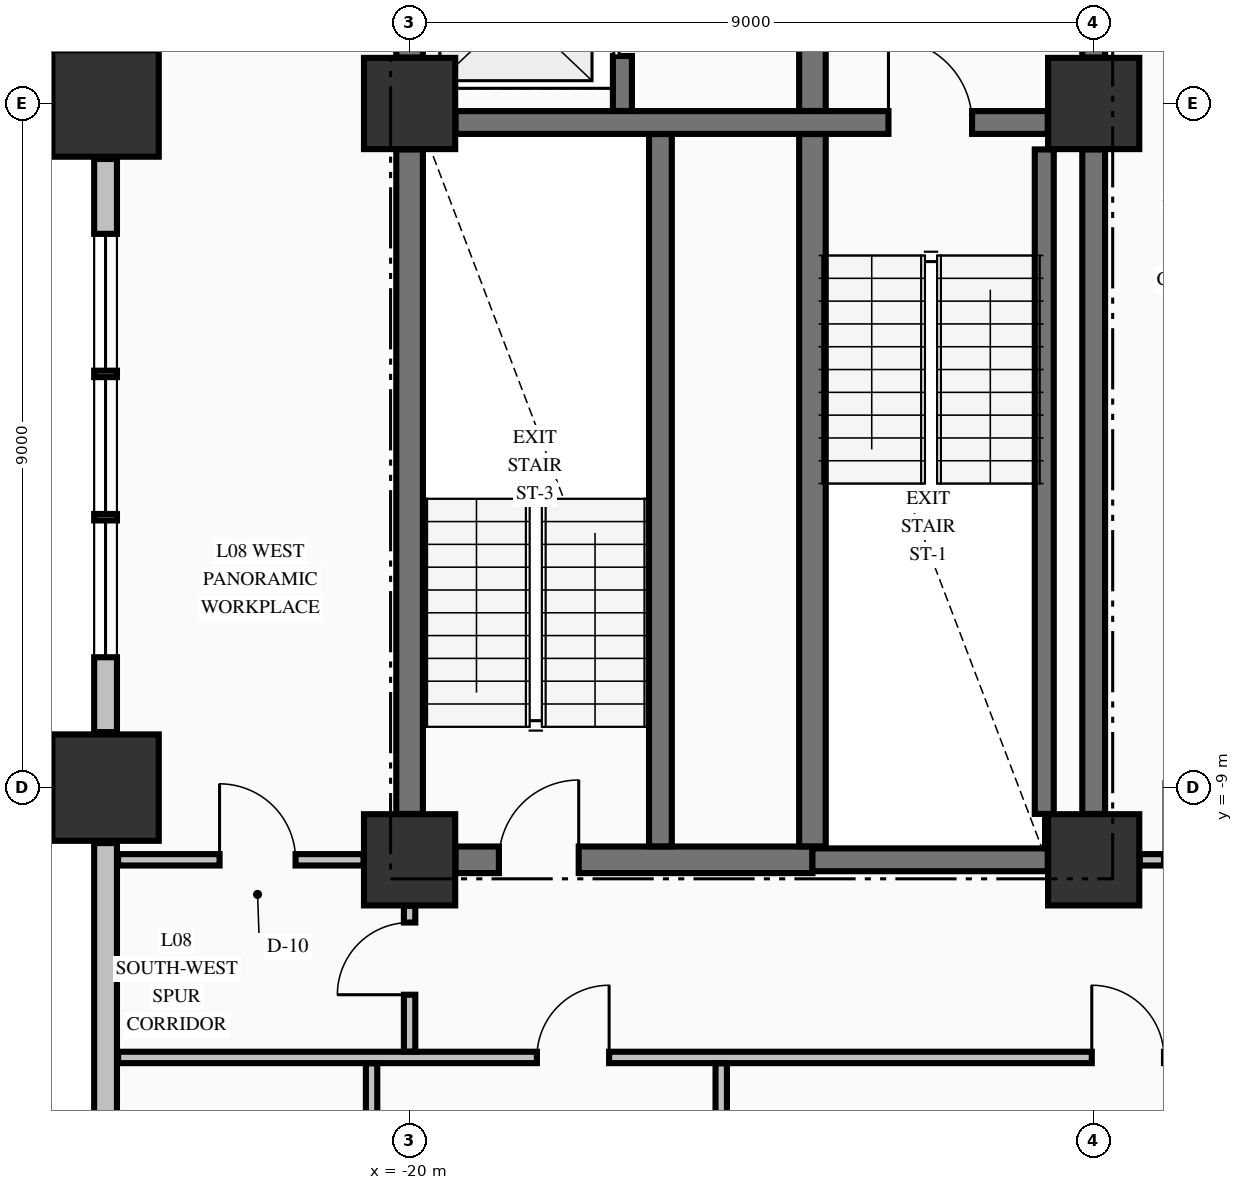
"""IFC4 building model, lengths in metres.
Left out: names, types, materials, properties, quantities, classifications, styles, units other than length and angle.
Written with IfcOpenShell. Run it as: python <this file> out.ifc"""

import sys

from ifc_helpers import new_model, si_unit, direction, frame, frame_2d, origin, origin_2d, place, context, subcontext, project, spatial, rectangle, extrude, element, fill, save


model = new_model("IFC4")
c1 = context("Model", 3, precision=1e-05, world=origin(), true_north=direction((0.0, 1.0)))
c2 = subcontext(c1, "Body", "Model", "MODEL_VIEW")
j1 = project(units=[si_unit("LENGTHUNIT", "METRE"), si_unit("PLANEANGLEUNIT", "RADIAN")], contexts=[c1])
p1 = place(None, origin())
s1 = spatial("IfcSite", under=j1, at=p1, CompositionType="ELEMENT")
p2 = place(p1, origin())
s2 = spatial("IfcBuilding", under=s1, at=p2, CompositionType="ELEMENT")
p3 = place(p2, frame((0.0, 0.0, 37.91)))
s3 = spatial("IfcBuildingStorey", under=s2, at=p3, CompositionType="ELEMENT", Elevation=37.91)
for number, where, z_axis, x_axis in (
    (1, (-24.0, -9.0, -0.25), (0.0, 0.0, 1.0), (1.0, 0.0, 0.0)),
    (2, (-24.0, 0.0, -0.25), (0.0, 0.0, 1.0), (1.0, 0.0, 0.0)),
):
    element("IfcColumn", number, at=place(p3, frame(where, z_axis=z_axis, x_axis=x_axis)), inside=s3, PredefinedType="COLUMN", context=c2, shape_type="SweptSolid", body=[
        extrude(rectangle(XDim=1.4, YDim=1.4, at=origin_2d()), origin(), (0.0, 0.0, 1.0), 3.57),
    ])
for number, where, z_axis, x_axis in (
    (3, (-20.0, -9.95, -0.25), (0.0, 0.0, 1.0), (1.0, 0.0, 0.0)),
    (4, (-11.0, -9.95, -0.25), (0.0, 0.0, 1.0), (1.0, 0.0, 0.0)),
    (5, (-11.0, 0.0, -0.25), (0.0, 0.0, 1.0), (1.0, 0.0, 0.0)),
    (6, (-20.0, 0.0, -0.25), (0.0, 0.0, 1.0), (1.0, 0.0, 0.0)),
):
    element("IfcColumn", number, at=place(p3, frame(where, z_axis=z_axis, x_axis=x_axis)), inside=s3, PredefinedType="COLUMN", context=c2, shape_type="SweptSolid", body=[
        extrude(rectangle(XDim=1.2, YDim=1.2, at=origin_2d()), origin(), (0.0, 0.0, 1.0), 3.57),
    ])
p4 = place(p3, frame((-24.0, -9.73, 0.0), z_axis=(0.0, 0.0, 1.0), x_axis=(0.0, -1.0, 0.0)))
e7 = element("IfcWall", 7, at=p4, inside=s3, PredefinedType="STANDARD", context=c2, shape_type="SweptSolid", body=[
    extrude(rectangle(XDim=12.54, YDim=0.3, at=frame_2d((6.27, 0.0))), origin(), (0.0, 0.0, 1.0), 2.712),
])
p5 = place(p3, frame((-24.0, -0.73, 0.0), z_axis=(0.0, 0.0, 1.0), x_axis=(0.0, -1.0, 0.0)))
e8 = element("IfcWall", 8, at=p5, inside=s3, PredefinedType="STANDARD", context=c2, shape_type="SweptSolid", body=[
    extrude(rectangle(XDim=7.54, YDim=0.3, at=frame_2d((3.77, 0.0))), origin(), (0.0, 0.0, 1.0), 2.712),
])
p6 = place(p5, frame((0.985, 0.0, 0.78)))
e9 = element("IfcOpeningElement", 9, at=p6, cuts=e8, PredefinedType="OPENING", context=c2, shape_type="SweptSolid", body=[
    extrude(rectangle(XDim=1.8, YDim=1.72, at=frame_2d((0.9, 0.86))), frame((0.0, 0.16, 0.0), z_axis=(0.0, -1.0, 0.0), x_axis=(1.0, 0.0, 0.0)), (0.0, 0.0, 1.0), 0.32),
])
p7 = place(p5, frame((2.87, 0.0, 0.78)))
e10 = element("IfcOpeningElement", 10, at=p7, cuts=e8, PredefinedType="OPENING", context=c2, shape_type="SweptSolid", body=[
    extrude(rectangle(XDim=1.8, YDim=1.72, at=frame_2d((0.9, 0.86))), frame((0.0, 0.16, 0.0), z_axis=(0.0, -1.0, 0.0), x_axis=(1.0, 0.0, 0.0)), (0.0, 0.0, 1.0), 0.32),
])
p8 = place(p5, frame((4.755, 0.0, 0.78)))
e11 = element("IfcOpeningElement", 11, at=p8, cuts=e8, PredefinedType="OPENING", context=c2, shape_type="SweptSolid", body=[
    extrude(rectangle(XDim=1.8, YDim=1.72, at=frame_2d((0.9, 0.86))), frame((0.0, 0.16, 0.0), z_axis=(0.0, -1.0, 0.0), x_axis=(1.0, 0.0, 0.0)), (0.0, 0.0, 1.0), 0.32),
])
p9 = place(p3, frame((-19.396, -9.95, 0.0), z_axis=(0.0, 0.0, 1.0), x_axis=(1.0, 0.0, 0.0)))
e12 = element("IfcWall", 12, at=p9, inside=s3, PredefinedType="SHEAR", context=c2, shape_type="SweptSolid", body=[
    extrude(rectangle(XDim=4.696, YDim=0.35, at=frame_2d((2.348, 0.0))), origin(), (0.0, 0.0, 1.0), 3.32),
])
p10 = place(p9, frame((0.571, 0.0, 0.0)))
e13 = element("IfcOpeningElement", 13, at=p10, cuts=e12, PredefinedType="OPENING", context=c2, shape_type="SweptSolid", body=[
    extrude(rectangle(XDim=1.05, YDim=2.15, at=frame_2d((0.525, 1.075))), frame((0.0, 0.185, 0.0), z_axis=(0.0, -1.0, 0.0), x_axis=(1.0, 0.0, 0.0)), (0.0, 0.0, 1.0), 0.37),
])
p11 = place(p3, frame((-14.7, -9.95, 0.0), z_axis=(0.0, 0.0, 1.0), x_axis=(1.0, 0.0, 0.0)))
e14 = element("IfcWall", 14, at=p11, inside=s3, PredefinedType="SHEAR", context=c2, shape_type="SweptSolid", body=[
    extrude(rectangle(XDim=3.096, YDim=0.3, at=frame_2d((1.548, 0.0))), origin(), (0.0, 0.0, 1.0), 3.32),
])
p12 = place(p3, frame((-19.396, -0.25, 0.0), z_axis=(0.0, 0.0, 1.0), x_axis=(1.0, 0.0, 0.0)))
e15 = element("IfcWall", 15, at=p12, inside=s3, PredefinedType="SHEAR", context=c2, shape_type="SweptSolid", body=[
    extrude(rectangle(XDim=7.792, YDim=0.3, at=frame_2d((3.896, 0.0))), origin(), (0.0, 0.0, 1.0), 3.32),
])
p13 = place(p12, frame((5.696, 0.0, 0.0)))
e16 = element("IfcOpeningElement", 16, at=p13, cuts=e15, PredefinedType="OPENING", context=c2, shape_type="SweptSolid", body=[
    extrude(rectangle(XDim=1.1, YDim=2.15, at=frame_2d((0.55, 1.075))), frame((0.0, 0.16, 0.0), z_axis=(0.0, -1.0, 0.0), x_axis=(1.0, 0.0, 0.0)), (0.0, 0.0, 1.0), 0.32),
])
p14 = place(p3, frame((-23.835, -12.55, 0.0), z_axis=(0.0, 0.0, 1.0), x_axis=(1.0, 0.0, 0.0)))
e17 = element("IfcWall", 17, at=p14, inside=s3, PredefinedType="PARTITIONING", context=c2, shape_type="SweptSolid", body=[
    extrude(rectangle(XDim=52.67, YDim=0.15, at=frame_2d((26.335, 0.0))), origin(), (0.0, 0.0, 1.0), 3.32),
])
p15 = place(p14, frame((5.51, 0.0, 0.0)))
e18 = element("IfcOpeningElement", 18, at=p15, cuts=e17, PredefinedType="OPENING", context=c2, shape_type="SweptSolid", body=[
    extrude(rectangle(XDim=0.95, YDim=2.15, at=frame_2d((0.475, 1.075))), frame((0.0, 0.085, 0.0), z_axis=(0.0, -1.0, 0.0), x_axis=(1.0, 0.0, 0.0)), (0.0, 0.0, 1.0), 0.17),
])
p16 = place(p14, frame((12.81, 0.0, 0.0)))
e19 = element("IfcOpeningElement", 19, at=p16, cuts=e17, PredefinedType="OPENING", context=c2, shape_type="SweptSolid", body=[
    extrude(rectangle(XDim=0.95, YDim=2.15, at=frame_2d((0.475, 1.075))), frame((0.0, 0.085, 0.0), z_axis=(0.0, -1.0, 0.0), x_axis=(1.0, 0.0, 0.0)), (0.0, 0.0, 1.0), 0.17),
])
p17 = place(p14, frame((19.01, 0.0, 0.0)))
e20 = element("IfcOpeningElement", 20, at=p17, cuts=e17, PredefinedType="OPENING", context=c2, shape_type="SweptSolid", body=[
    extrude(rectangle(XDim=1.05, YDim=2.15, at=frame_2d((0.525, 1.075))), frame((0.0, 0.085, 0.0), z_axis=(0.0, -1.0, 0.0), x_axis=(1.0, 0.0, 0.0)), (0.0, 0.0, 1.0), 0.17),
])
p18 = place(p14, frame((27.06, 0.0, 0.0)))
e21 = element("IfcOpeningElement", 21, at=p18, cuts=e17, PredefinedType="OPENING", context=c2, shape_type="SweptSolid", body=[
    extrude(rectangle(XDim=0.95, YDim=2.15, at=frame_2d((0.475, 1.075))), frame((0.0, 0.085, 0.0), z_axis=(0.0, -1.0, 0.0), x_axis=(1.0, 0.0, 0.0)), (0.0, 0.0, 1.0), 0.17),
])
p19 = place(p14, frame((34.81, 0.0, 0.0)))
e22 = element("IfcOpeningElement", 22, at=p19, cuts=e17, PredefinedType="OPENING", context=c2, shape_type="SweptSolid", body=[
    extrude(rectangle(XDim=0.95, YDim=2.15, at=frame_2d((0.475, 1.075))), frame((0.0, 0.085, 0.0), z_axis=(0.0, -1.0, 0.0), x_axis=(1.0, 0.0, 0.0)), (0.0, 0.0, 1.0), 0.17),
])
p20 = place(p14, frame((39.76, 0.0, 0.0)))
e23 = element("IfcOpeningElement", 23, at=p20, cuts=e17, PredefinedType="OPENING", context=c2, shape_type="SweptSolid", body=[
    extrude(rectangle(XDim=1.05, YDim=2.15, at=frame_2d((0.525, 1.075))), frame((0.0, 0.085, 0.0), z_axis=(0.0, -1.0, 0.0), x_axis=(1.0, 0.0, 0.0)), (0.0, 0.0, 1.0), 0.17),
])
p21 = place(p3, frame((-23.835, -9.95, 0.0), z_axis=(0.0, 0.0, 1.0), x_axis=(1.0, 0.0, 0.0)))
e24 = element("IfcWall", 24, at=p21, inside=s3, PredefinedType="PARTITIONING", context=c2, shape_type="SweptSolid", body=[
    extrude(rectangle(XDim=3.229, YDim=0.15, at=frame_2d((1.615, 0.0))), origin(), (0.0, 0.0, 1.0), 3.32),
])
p22 = place(p21, frame((1.335, 0.0, 0.0)))
e25 = element("IfcOpeningElement", 25, at=p22, cuts=e24, PredefinedType="OPENING", context=c2, shape_type="SweptSolid", body=[
    extrude(rectangle(XDim=1.0, YDim=2.15, at=frame_2d((0.5, 1.075))), frame((0.0, 0.085, 0.0), z_axis=(0.0, -1.0, 0.0), x_axis=(1.0, 0.0, 0.0)), (0.0, 0.0, 1.0), 0.17),
])
p23 = place(p3, frame((-10.394, -9.95, 0.0), z_axis=(0.0, 0.0, 1.0), x_axis=(1.0, 0.0, 0.0)))
e26 = element("IfcWall", 26, at=p23, inside=s3, PredefinedType="PARTITIONING", context=c2, shape_type="SweptSolid", body=[
    extrude(rectangle(XDim=20.788, YDim=0.15, at=frame_2d((10.394, 0.0))), origin(), (0.0, 0.0, 1.0), 3.32),
])
p24 = place(p23, frame((0.319, 0.0, 0.0)))
e27 = element("IfcOpeningElement", 27, at=p24, cuts=e26, PredefinedType="OPENING", context=c2, shape_type="SweptSolid", body=[
    extrude(rectangle(XDim=1.05, YDim=2.15, at=frame_2d((0.525, 1.075))), frame((0.0, 0.085, 0.0), z_axis=(0.0, -1.0, 0.0), x_axis=(1.0, 0.0, 0.0)), (0.0, 0.0, 1.0), 0.17),
])
p25 = place(p23, frame((19.419, 0.0, 0.0)))
e28 = element("IfcOpeningElement", 28, at=p25, cuts=e26, PredefinedType="OPENING", context=c2, shape_type="SweptSolid", body=[
    extrude(rectangle(XDim=1.05, YDim=2.15, at=frame_2d((0.525, 1.075))), frame((0.0, 0.085, 0.0), z_axis=(0.0, -1.0, 0.0), x_axis=(1.0, 0.0, 0.0)), (0.0, 0.0, 1.0), 0.17),
])
p26 = place(p23, frame((11.569, 0.0, 0.0)))
e29 = element("IfcOpeningElement", 29, at=p26, cuts=e26, PredefinedType="OPENING", context=c2, shape_type="SweptSolid", body=[
    extrude(rectangle(XDim=0.95, YDim=2.15, at=frame_2d((0.475, 1.075))), frame((0.0, 0.085, 0.0), z_axis=(0.0, -1.0, 0.0), x_axis=(1.0, 0.0, 0.0)), (0.0, 0.0, 1.0), 0.17),
])
p27 = place(p3, frame((-20.0, -9.346, 0.0), z_axis=(0.0, 0.0, 1.0), x_axis=(0.0, 1.0, 0.0)))
e30 = element("IfcWall", 30, at=p27, inside=s3, PredefinedType="SHEAR", context=c2, shape_type="SweptSolid", body=[
    extrude(rectangle(XDim=8.742, YDim=0.35, at=frame_2d((4.371, 0.0))), origin(), (0.0, 0.0, 1.0), 3.32),
])
p28 = place(p3, frame((-20.0, 0.604, 0.0), z_axis=(0.0, 0.0, 1.0), x_axis=(0.0, 1.0, 0.0)))
e31 = element("IfcWall", 31, at=p28, inside=s3, PredefinedType="SHEAR", context=c2, shape_type="SweptSolid", body=[
    extrude(rectangle(XDim=1.869, YDim=0.35, at=frame_2d((0.935, 0.0))), origin(), (0.0, 0.0, 1.0), 3.32),
])
p29 = place(p3, frame((-17.2, -0.098, 0.0), z_axis=(0.0, 0.0, 1.0), x_axis=(0.0, 1.0, 0.0)))
e32 = element("IfcWall", 32, at=p29, inside=s3, PredefinedType="SOLIDWALL", context=c2, shape_type="SweptSolid", body=[
    extrude(rectangle(XDim=2.571, YDim=0.25, at=frame_2d((1.285, 0.0))), origin(), (0.0, 0.0, 1.0), 3.32),
])
p30 = place(p29, frame((0.723, 0.0, 0.0)))
e33 = element("IfcOpeningElement", 33, at=p30, cuts=e32, PredefinedType="OPENING", context=c2, shape_type="SweptSolid", body=[
    extrude(rectangle(XDim=1.1, YDim=2.2, at=frame_2d((0.55, 1.1))), frame((0.0, 0.135, 0.0), z_axis=(0.0, -1.0, 0.0), x_axis=(1.0, 0.0, 0.0)), (0.0, 0.0, 1.0), 0.27),
])
p31 = place(p3, frame((-16.7, -9.773, 0.0), z_axis=(0.0, 0.0, 1.0), x_axis=(0.0, 1.0, 0.0)))
e34 = element("IfcWall", 34, at=p31, inside=s3, PredefinedType="SHEAR", context=c2, shape_type="SweptSolid", body=[
    extrude(rectangle(XDim=9.371, YDim=0.3, at=frame_2d((4.686, 0.0))), origin(), (0.0, 0.0, 1.0), 3.32),
])
p32 = place(p3, frame((-14.7, -9.773, 0.0), z_axis=(0.0, 0.0, 1.0), x_axis=(0.0, 1.0, 0.0)))
e35 = element("IfcWall", 35, at=p32, inside=s3, PredefinedType="SHEAR", context=c2, shape_type="SweptSolid", body=[
    extrude(rectangle(XDim=9.371, YDim=0.35, at=frame_2d((4.686, 0.0))), origin(), (0.0, 0.0, 1.0), 3.32),
])
p33 = place(p3, frame((-14.7, -0.098, 0.0), z_axis=(0.0, 0.0, 1.0), x_axis=(0.0, 1.0, 0.0)))
e36 = element("IfcWall", 36, at=p33, inside=s3, PredefinedType="SHEAR", context=c2, shape_type="SweptSolid", body=[
    extrude(rectangle(XDim=2.846, YDim=0.35, at=frame_2d((1.423, 0.0))), origin(), (0.0, 0.0, 1.0), 3.32),
])
p34 = place(p3, frame((-11.65, -9.346, 0.0), z_axis=(0.0, 0.0, 1.0), x_axis=(0.0, 1.0, 0.0)))
e37 = element("IfcWall", 37, at=p34, inside=s3, PredefinedType="SOLIDWALL", context=c2, shape_type="SweptSolid", body=[
    extrude(rectangle(XDim=8.742, YDim=0.25, at=frame_2d((4.371, 0.0))), origin(), (0.0, 0.0, 1.0), 3.32),
])
p35 = place(p3, frame((-11.0, -9.346, 0.0), z_axis=(0.0, 0.0, 1.0), x_axis=(0.0, 1.0, 0.0)))
e38 = element("IfcWall", 38, at=p35, inside=s3, PredefinedType="SHEAR", context=c2, shape_type="SweptSolid", body=[
    extrude(rectangle(XDim=8.742, YDim=0.3, at=frame_2d((4.371, 0.0))), origin(), (0.0, 0.0, 1.0), 3.32),
])
p36 = place(p3, frame((-11.0, 0.604, 0.0), z_axis=(0.0, 0.0, 1.0), x_axis=(0.0, 1.0, 0.0)))
e39 = element("IfcWall", 39, at=p36, inside=s3, PredefinedType="SHEAR", context=c2, shape_type="SweptSolid", body=[
    extrude(rectangle(XDim=2.144, YDim=0.3, at=frame_2d((1.072, 0.0))), origin(), (0.0, 0.0, 1.0), 3.32),
])
p37 = place(p36, frame((0.496, 0.0, 0.0)))
e40 = element("IfcOpeningElement", 40, at=p37, cuts=e39, PredefinedType="OPENING", context=c2, shape_type="SweptSolid", body=[
    extrude(rectangle(XDim=1.1, YDim=2.15, at=frame_2d((0.55, 1.075))), frame((0.0, 0.16, 0.0), z_axis=(0.0, -1.0, 0.0), x_axis=(1.0, 0.0, 0.0)), (0.0, 0.0, 1.0), 0.32),
])
p38 = place(p3, frame((-20.5, -22.294, 0.0), z_axis=(0.0, 0.0, 1.0), x_axis=(0.0, 1.0, 0.0)))
e41 = element("IfcWall", 41, at=p38, inside=s3, PredefinedType="PARTITIONING", context=c2, shape_type="SweptSolid", body=[
    extrude(rectangle(XDim=9.666, YDim=0.15, at=frame_2d((4.833, 0.0))), origin(), (0.0, 0.0, 1.0), 3.32),
])
p39 = place(p3, frame((-20.0, -12.472, 0.0), z_axis=(0.0, 0.0, 1.0), x_axis=(0.0, 1.0, 0.0)))
e42 = element("IfcWall", 42, at=p39, inside=s3, PredefinedType="PARTITIONING", context=c2, shape_type="SweptSolid", body=[
    extrude(rectangle(XDim=1.916, YDim=0.15, at=frame_2d((0.958, 0.0))), origin(), (0.0, 0.0, 1.0), 3.32),
])
p40 = place(p39, frame((0.747, 0.0, 0.0)))
e43 = element("IfcOpeningElement", 43, at=p40, cuts=e42, PredefinedType="OPENING", context=c2, shape_type="SweptSolid", body=[
    extrude(rectangle(XDim=0.95, YDim=2.15, at=frame_2d((0.475, 1.075))), frame((0.0, 0.085, 0.0), z_axis=(0.0, -1.0, 0.0), x_axis=(1.0, 0.0, 0.0)), (0.0, 0.0, 1.0), 0.17),
])
p41 = place(p3, frame((-15.9, -26.335, 0.0), z_axis=(0.0, 0.0, 1.0), x_axis=(0.0, 1.0, 0.0)))
e44 = element("IfcWall", 44, at=p41, inside=s3, PredefinedType="PARTITIONING", context=c2, shape_type="SweptSolid", body=[
    extrude(rectangle(XDim=13.707, YDim=0.15, at=frame_2d((6.854, 0.0))), origin(), (0.0, 0.0, 1.0), 3.32),
])
p42 = place(p6, origin())
e45 = element("IfcWindow", 45, at=p42, inside=s3, PartitioningType="SINGLE_PANEL", PredefinedType="WINDOW", context=c2, shape_type="SweptSolid", body=[
    extrude(rectangle(XDim=1.8, YDim=1.72, at=frame_2d((0.9, 0.86))), frame((0.0, 0.03, 0.0), z_axis=(0.0, -1.0, 0.0), x_axis=(1.0, 0.0, 0.0)), (0.0, 0.0, 1.0), 0.06),
])
fill(e9, e45)
p43 = place(p7, origin())
e46 = element("IfcWindow", 46, at=p43, inside=s3, PartitioningType="SINGLE_PANEL", PredefinedType="WINDOW", context=c2, shape_type="SweptSolid", body=[
    extrude(rectangle(XDim=1.8, YDim=1.72, at=frame_2d((0.9, 0.86))), frame((0.0, 0.03, 0.0), z_axis=(0.0, -1.0, 0.0), x_axis=(1.0, 0.0, 0.0)), (0.0, 0.0, 1.0), 0.06),
])
fill(e10, e46)
p44 = place(p8, origin())
e47 = element("IfcWindow", 47, at=p44, inside=s3, PartitioningType="SINGLE_PANEL", PredefinedType="WINDOW", context=c2, shape_type="SweptSolid", body=[
    extrude(rectangle(XDim=1.8, YDim=1.72, at=frame_2d((0.9, 0.86))), frame((0.0, 0.03, 0.0), z_axis=(0.0, -1.0, 0.0), x_axis=(1.0, 0.0, 0.0)), (0.0, 0.0, 1.0), 0.06),
])
fill(e11, e47)
p45 = place(p13, origin())
e48 = element("IfcDoor", 48, at=p45, inside=s3, OperationType="SINGLE_SWING_LEFT", PredefinedType="DOOR", context=c2, shape_type="SweptSolid", body=[
    extrude(rectangle(XDim=1.1, YDim=2.15, at=frame_2d((0.55, 1.075))), frame((0.0, 0.025, 0.0), z_axis=(0.0, -1.0, 0.0), x_axis=(1.0, 0.0, 0.0)), (0.0, 0.0, 1.0), 0.05),
])
fill(e16, e48)
p46 = place(p10, origin())
e49 = element("IfcDoor", 49, at=p46, inside=s3, OperationType="SINGLE_SWING_RIGHT", PredefinedType="DOOR", context=c2, shape_type="SweptSolid", body=[
    extrude(rectangle(XDim=1.05, YDim=2.15, at=frame_2d((0.525, 1.075))), frame((0.0, 0.025, 0.0), z_axis=(0.0, -1.0, 0.0), x_axis=(1.0, 0.0, 0.0)), (0.0, 0.0, 1.0), 0.05),
])
fill(e13, e49)
p47 = place(p30, origin())
e50 = element("IfcDoor", 50, at=p47, inside=s3, OperationType="SLIDING_TO_LEFT", PredefinedType="DOOR", context=c2, shape_type="SweptSolid", body=[
    extrude(rectangle(XDim=1.1, YDim=2.2, at=frame_2d((0.55, 1.1))), frame((0.0, 0.025, 0.0), z_axis=(0.0, -1.0, 0.0), x_axis=(1.0, 0.0, 0.0)), (0.0, 0.0, 1.0), 0.05),
])
fill(e33, e50)
p48 = place(p15, origin())
e51 = element("IfcDoor", 51, at=p48, inside=s3, OperationType="SINGLE_SWING_RIGHT", PredefinedType="DOOR", context=c2, shape_type="SweptSolid", body=[
    extrude(rectangle(XDim=0.95, YDim=2.15, at=frame_2d((0.475, 1.075))), frame((0.0, 0.025, 0.0), z_axis=(0.0, -1.0, 0.0), x_axis=(1.0, 0.0, 0.0)), (0.0, 0.0, 1.0), 0.05),
])
fill(e18, e51)
p49 = place(p16, origin())
e52 = element("IfcDoor", 52, at=p49, inside=s3, OperationType="SINGLE_SWING_LEFT", PredefinedType="DOOR", context=c2, shape_type="SweptSolid", body=[
    extrude(rectangle(XDim=0.95, YDim=2.15, at=frame_2d((0.475, 1.075))), frame((0.0, 0.025, 0.0), z_axis=(0.0, -1.0, 0.0), x_axis=(1.0, 0.0, 0.0)), (0.0, 0.0, 1.0), 0.05),
])
fill(e19, e52)
p50 = place(p40, origin())
e53 = element("IfcDoor", 53, at=p50, inside=s3, OperationType="SINGLE_SWING_LEFT", PredefinedType="DOOR", context=c2, shape_type="SweptSolid", body=[
    extrude(rectangle(XDim=0.95, YDim=2.15, at=frame_2d((0.475, 1.075))), frame((0.0, 0.025, 0.0), z_axis=(0.0, -1.0, 0.0), x_axis=(1.0, 0.0, 0.0)), (0.0, 0.0, 1.0), 0.05),
])
fill(e43, e53)
p51 = place(p22, origin())
e54 = element("IfcDoor", 54, at=p51, inside=s3, OperationType="SINGLE_SWING_LEFT", PredefinedType="DOOR", context=c2, shape_type="SweptSolid", body=[
    extrude(rectangle(XDim=1.0, YDim=2.15, at=frame_2d((0.5, 1.075))), frame((0.0, 0.025, 0.0), z_axis=(0.0, -1.0, 0.0), x_axis=(1.0, 0.0, 0.0)), (0.0, 0.0, 1.0), 0.05),
])
fill(e25, e54)
save(model, sys.argv[1])
